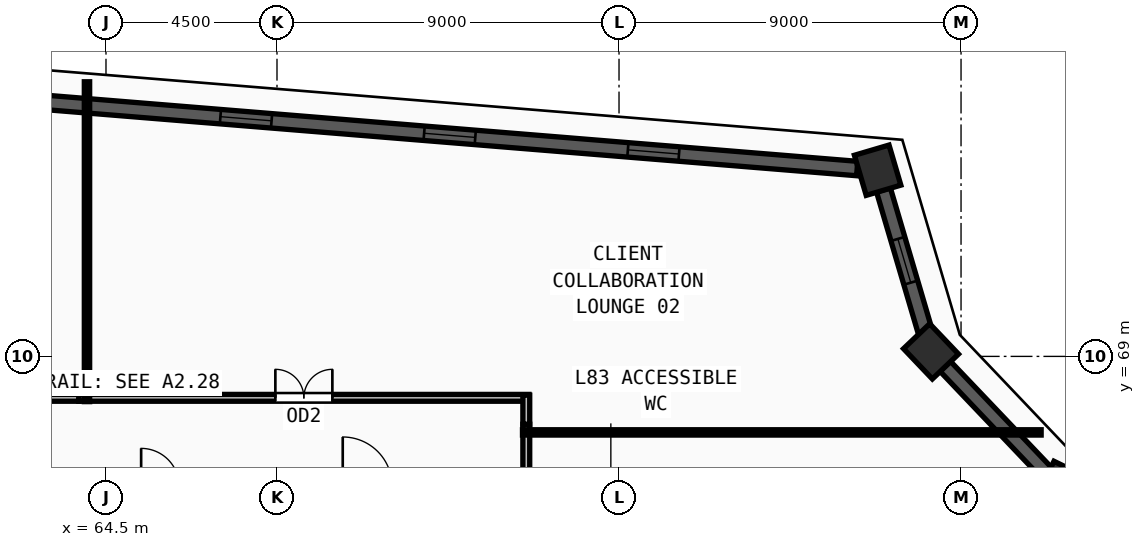
"""IFC4 building model, lengths in metres.
Left out: names, types, materials, properties, quantities, classifications, styles, units other than length and angle.
Written with IfcOpenShell. Run it as: python <this file> out.ifc"""

import sys

from ifc_helpers import new_model, si_unit, direction, frame, frame_2d, origin, origin_2d, place, context, subcontext, project, spatial, rectangle, extrude, source, transform, mapped, element, fill, save


model = new_model("IFC4")
c1 = context("Model", 3, precision=1e-05, world=origin(), true_north=direction((0.0, 1.0)))
c2 = subcontext(c1, "Body", "Model", "MODEL_VIEW")
j1 = project(units=[si_unit("LENGTHUNIT", "METRE"), si_unit("PLANEANGLEUNIT", "RADIAN")], contexts=[c1])
p1 = place(None, origin())
s1 = spatial("IfcSite", under=j1, at=p1, CompositionType="ELEMENT")
p2 = place(p1, origin())
s2 = spatial("IfcBuilding", under=s1, at=p2, CompositionType="ELEMENT")
p3 = place(p2, frame((0.0, 0.0, 320.25)))
s3 = spatial("IfcBuildingStorey", under=s2, at=p3, CompositionType="ELEMENT", Elevation=320.25)
m1 = source(origin(), c2, "Body", "SweptSolid", [
    extrude(rectangle(XDim=1.1, YDim=0.95, at=origin_2d()), origin(), (0.0, 0.0, 1.0), 3.75),
])
for number, where, z_axis, x_axis in (
    (1, (84.805, 73.899, 0.0), (0.0, 0.0, 1.0), (-0.283, 0.959, 0.0)),
    (2, (86.21, 69.132, 0.0), (0.0, 0.0, 1.0), (-0.689, 0.724, 0.0)),
    (3, (89.63, 65.538, 0.0), (0.0, 0.0, 1.0), (0.44, 0.898, 0.0)),
):
    element("IfcColumn", number, at=place(p3, frame(where, z_axis=z_axis, x_axis=x_axis)), inside=s3, PredefinedType="COLUMN", context=c2, shape_type="MappedRepresentation", body=[
        mapped(m1, transform((0.0, 0.0, 0.0), x_axis=(1.0, 0.0, 0.0), y_axis=(0.0, 1.0, 0.0), z_axis=(0.0, 0.0, 1.0), scale=1.0)),
    ])
p4 = place(p3, frame((89.258, 65.929, 0.0), z_axis=(0.0, 0.0, 1.0), x_axis=(-0.689374007366, 0.724405603215, 0.0)))
e4 = element("IfcWall", 4, at=p4, inside=s3, PredefinedType="SOLIDWALL", context=c2, shape_type="SweptSolid", body=[
    extrude(rectangle(XDim=3.882, YDim=0.38, at=frame_2d((1.941, 0.0))), origin(), (0.0, 0.0, 1.0), 3.47),
])
p5 = place(p3, frame((86.057, 69.65, 0.0), z_axis=(0.0, 0.0, 1.0), x_axis=(-0.282512921689, 0.95926349304, 0.0)))
e5 = element("IfcWall", 5, at=p5, inside=s3, PredefinedType="SOLIDWALL", context=c2, shape_type="SweptSolid", body=[
    extrude(rectangle(XDim=3.89, YDim=0.38, at=frame_2d((1.945, 0.0))), origin(), (0.0, 0.0, 1.0), 3.47),
])
m2 = source(origin(), c2, "Body", "SweptSolid", [
    extrude(rectangle(XDim=1.2, YDim=1.9, at=frame_2d((0.6, 0.95))), frame((0.0, 0.2, 0.0), z_axis=(0.0, -1.0, 0.0), x_axis=(1.0, 0.0, 0.0)), (0.0, 0.0, 1.0), 0.4),
])
p6 = place(p5, frame((1.345, 0.0, 0.55)))
e6 = element("IfcOpeningElement", 6, at=p6, cuts=e5, PredefinedType="OPENING", context=c2, shape_type="MappedRepresentation", body=[
    mapped(m2, transform((0.0, 0.0, 0.0), x_axis=(1.0, 0.0, 0.0), y_axis=(0.0, 1.0, 0.0), z_axis=(0.0, 0.0, 1.0), scale=1.0)),
])
p7 = place(p3, frame((84.267, 73.943, 0.0), z_axis=(0.0, 0.0, 1.0), x_axis=(-0.996698591672, 0.081190623594, 0.0)))
e7 = element("IfcWall", 7, at=p7, inside=s3, PredefinedType="SOLIDWALL", context=c2, shape_type="SweptSolid", body=[
    extrude(rectangle(XDim=21.515, YDim=0.38, at=frame_2d((10.758, 0.0))), origin(), (0.0, 0.0, 1.0), 3.47),
])
m3 = source(origin(), c2, "Body", "SweptSolid", [
    extrude(rectangle(XDim=1.35, YDim=1.85, at=frame_2d((0.675, 0.925))), frame((0.0, 0.2, 0.0), z_axis=(0.0, -1.0, 0.0), x_axis=(1.0, 0.0, 0.0)), (0.0, 0.0, 1.0), 0.4),
])
p8 = place(p7, frame((4.704, 0.0, 0.55)))
e8 = element("IfcOpeningElement", 8, at=p8, cuts=e7, PredefinedType="OPENING", context=c2, shape_type="MappedRepresentation", body=[
    mapped(m3, transform((0.0, 0.0, 0.0), x_axis=(1.0, 0.0, 0.0), y_axis=(0.0, 1.0, 0.0), z_axis=(0.0, 0.0, 1.0), scale=1.0)),
])
p9 = place(p7, frame((10.083, 0.0, 0.55)))
e9 = element("IfcOpeningElement", 9, at=p9, cuts=e7, PredefinedType="OPENING", context=c2, shape_type="MappedRepresentation", body=[
    mapped(m3, transform((0.0, 0.0, 0.0), x_axis=(1.0, 0.0, 0.0), y_axis=(0.0, 1.0, 0.0), z_axis=(0.0, 0.0, 1.0), scale=1.0)),
])
p10 = place(p7, frame((15.461, 0.0, 0.55)))
e10 = element("IfcOpeningElement", 10, at=p10, cuts=e7, PredefinedType="OPENING", context=c2, shape_type="MappedRepresentation", body=[
    mapped(m3, transform((0.0, 0.0, 0.0), x_axis=(1.0, 0.0, 0.0), y_axis=(0.0, 1.0, 0.0), z_axis=(0.0, 0.0, 1.0), scale=1.0)),
])
p11 = place(p3, frame((63.785, 67.91, 0.0), z_axis=(0.0, 0.0, 1.0), x_axis=(1.0, 0.0, 0.0)))
e11 = element("IfcWall", 11, at=p11, inside=s3, PredefinedType="PARTITIONING", context=c2, shape_type="SweptSolid", body=[
    extrude(rectangle(XDim=11.845, YDim=0.18, at=frame_2d((5.922, 0.0))), origin(), (0.0, 0.0, 1.0), 3.47),
])
m4 = source(origin(), c2, "Body", "SweptSolid", [
    extrude(rectangle(XDim=1.5, YDim=2.2, at=frame_2d((0.75, 1.1))), frame((0.0, 0.1, 0.0), z_axis=(0.0, -1.0, 0.0), x_axis=(1.0, 0.0, 0.0)), (0.0, 0.0, 1.0), 0.2),
])
p12 = place(p11, frame((5.172, 0.0, 0.0)))
e12 = element("IfcOpeningElement", 12, at=p12, cuts=e11, PredefinedType="OPENING", context=c2, shape_type="MappedRepresentation", body=[
    mapped(m4, transform((0.0, 0.0, 0.0), x_axis=(1.0, 0.0, 0.0), y_axis=(0.0, 1.0, 0.0), z_axis=(0.0, 0.0, 1.0), scale=1.0)),
])
p13 = place(p3, frame((54.19, 67.91, 0.0), z_axis=(0.0, 0.0, 1.0), x_axis=(1.0, 0.0, 0.0)))
e13 = element("IfcWall", 13, at=p13, inside=s3, PredefinedType="PARTITIONING", context=c2, shape_type="SweptSolid", body=[
    extrude(rectangle(XDim=9.595, YDim=0.18, at=frame_2d((4.797, 0.0))), origin(), (0.0, 0.0, 1.0), 3.47),
])
m5 = source(origin(), c2, "Body", "SweptSolid", [
    extrude(rectangle(XDim=1.0, YDim=2.2, at=frame_2d((0.5, 1.1))), frame((0.0, 0.1, 0.0), z_axis=(0.0, -1.0, 0.0), x_axis=(1.0, 0.0, 0.0)), (0.0, 0.0, 1.0), 0.2),
])
p14 = place(p13, frame((4.297, 0.0, 0.0)))
e14 = element("IfcOpeningElement", 14, at=p14, cuts=e13, PredefinedType="OPENING", context=c2, shape_type="MappedRepresentation", body=[
    mapped(m5, transform((0.0, 0.0, 0.0), x_axis=(1.0, 0.0, 0.0), y_axis=(0.0, 1.0, 0.0), z_axis=(0.0, 0.0, 1.0), scale=1.0)),
])
p15 = place(p3, frame((75.56, 67.215, 0.0), z_axis=(0.0, 0.0, 1.0), x_axis=(0.0, -1.0, 0.0)))
e15 = element("IfcWall", 15, at=p15, inside=s3, PredefinedType="PARTITIONING", context=c2, shape_type="SweptSolid", body=[
    extrude(rectangle(XDim=2.235, YDim=0.18, at=frame_2d((1.118, 0.0))), origin(), (0.0, 0.0, 1.0), 3.47),
])
p16 = place(p3, frame((75.56, 67.98, 0.0), z_axis=(0.0, 0.0, 1.0), x_axis=(0.0, -1.0, 0.0)))
e16 = element("IfcWall", 16, at=p16, inside=s3, PredefinedType="PARTITIONING", context=c2, shape_type="SweptSolid", body=[
    extrude(rectangle(XDim=0.765, YDim=0.18, at=frame_2d((0.382, 0.0))), origin(), (0.0, 0.0, 1.0), 3.47),
])
p17 = place(p3, frame((75.46, 67.0, 0.0), z_axis=(0.0, 0.0, 1.0), x_axis=(1.0, 0.0, 0.0)))
e17 = element("IfcWall", 17, at=p17, inside=s3, PredefinedType="PARTITIONING", context=c2, shape_type="SweptSolid", body=[
    extrude(rectangle(XDim=13.648, YDim=0.14, at=frame_2d((6.824, 0.0))), origin(), (0.0, 0.0, 1.0), 3.161),
])
p18 = place(p3, frame((64.0, 67.81, 0.0), z_axis=(0.0, 0.0, 1.0), x_axis=(0.0, 1.0, 0.0)))
e18 = element("IfcWall", 18, at=p18, inside=s3, PredefinedType="PARTITIONING", context=c2, shape_type="SweptSolid", body=[
    extrude(rectangle(XDim=8.416, YDim=0.14, at=frame_2d((4.208, 0.0))), origin(), (0.0, 0.0, 1.0), 3.47),
])
m6 = source(origin(), c2, "Body", "SweptSolid", [
    extrude(rectangle(XDim=1.2, YDim=1.9, at=frame_2d((0.6, 0.95))), frame((0.0, 0.03, 0.0), z_axis=(0.0, -1.0, 0.0), x_axis=(1.0, 0.0, 0.0)), (0.0, 0.0, 1.0), 0.06),
])
p19 = place(p6, origin())
e19 = element("IfcWindow", 19, at=p19, inside=s3, PartitioningType="SINGLE_PANEL", PredefinedType="WINDOW", context=c2, shape_type="MappedRepresentation", body=[
    mapped(m6, transform((0.0, 0.0, 0.0), x_axis=(1.0, 0.0, 0.0), y_axis=(0.0, 1.0, 0.0), z_axis=(0.0, 0.0, 1.0), scale=1.0)),
])
fill(e6, e19)
m7 = source(origin(), c2, "Body", "SweptSolid", [
    extrude(rectangle(XDim=1.35, YDim=1.85, at=frame_2d((0.675, 0.925))), frame((0.0, 0.03, 0.0), z_axis=(0.0, -1.0, 0.0), x_axis=(1.0, 0.0, 0.0)), (0.0, 0.0, 1.0), 0.06),
])
p20 = place(p8, origin())
e20 = element("IfcWindow", 20, at=p20, inside=s3, PartitioningType="SINGLE_PANEL", PredefinedType="WINDOW", context=c2, shape_type="MappedRepresentation", body=[
    mapped(m7, transform((0.0, 0.0, 0.0), x_axis=(1.0, 0.0, 0.0), y_axis=(0.0, 1.0, 0.0), z_axis=(0.0, 0.0, 1.0), scale=1.0)),
])
fill(e8, e20)
p21 = place(p9, origin())
e21 = element("IfcWindow", 21, at=p21, inside=s3, PartitioningType="SINGLE_PANEL", PredefinedType="WINDOW", context=c2, shape_type="MappedRepresentation", body=[
    mapped(m7, transform((0.0, 0.0, 0.0), x_axis=(1.0, 0.0, 0.0), y_axis=(0.0, 1.0, 0.0), z_axis=(0.0, 0.0, 1.0), scale=1.0)),
])
fill(e9, e21)
p22 = place(p10, origin())
e22 = element("IfcWindow", 22, at=p22, inside=s3, PartitioningType="SINGLE_PANEL", PredefinedType="WINDOW", context=c2, shape_type="MappedRepresentation", body=[
    mapped(m7, transform((0.0, 0.0, 0.0), x_axis=(1.0, 0.0, 0.0), y_axis=(0.0, 1.0, 0.0), z_axis=(0.0, 0.0, 1.0), scale=1.0)),
])
fill(e10, e22)
m8 = source(origin(), c2, "Body", "SweptSolid", [
    extrude(rectangle(XDim=1.5, YDim=2.2, at=frame_2d((0.75, 1.1))), frame((0.0, 0.025, 0.0), z_axis=(0.0, -1.0, 0.0), x_axis=(1.0, 0.0, 0.0)), (0.0, 0.0, 1.0), 0.05),
])
p23 = place(p12, origin())
e23 = element("IfcDoor", 23, at=p23, inside=s3, OperationType="DOUBLE_DOOR_SINGLE_SWING", PredefinedType="DOOR", context=c2, shape_type="MappedRepresentation", body=[
    mapped(m8, transform((0.0, 0.0, 0.0), x_axis=(1.0, 0.0, 0.0), y_axis=(0.0, 1.0, 0.0), z_axis=(0.0, 0.0, 1.0), scale=1.0)),
])
fill(e12, e23)
save(model, sys.argv[1])
